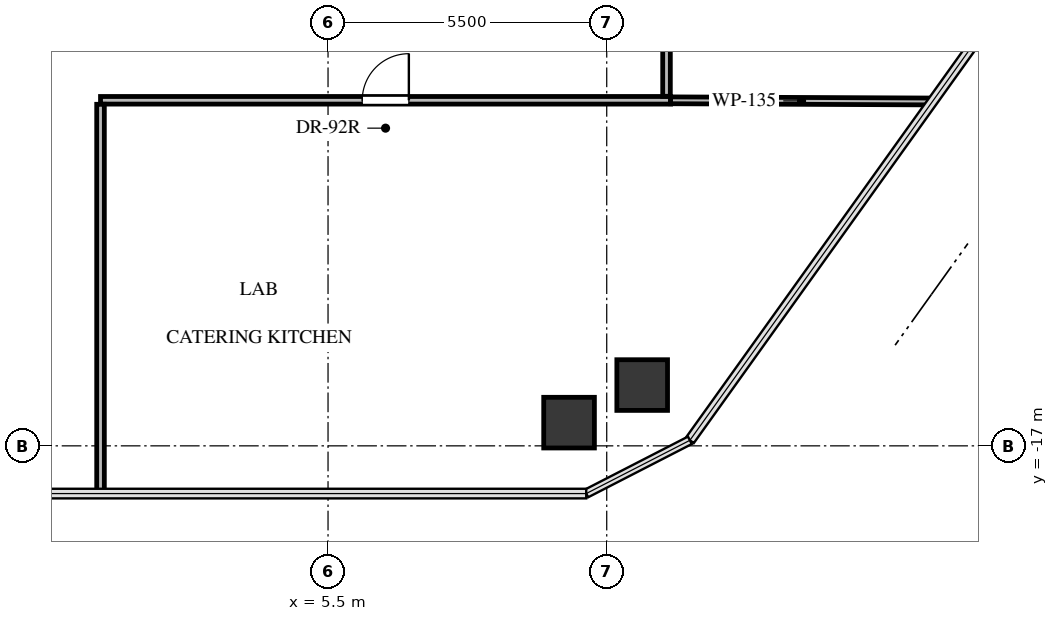
"""IFC4 building model, lengths in metres.
Left out: names, types, materials, properties, quantities, classifications, styles, units other than length and angle.
Written with IfcOpenShell. Run it as: python <this file> out.ifc"""

import sys

from ifc_helpers import new_model, si_unit, direction, frame, frame_2d, origin, origin_2d, place, context, subcontext, project, spatial, rectangle, extrude, source, transform, mapped, element, fill, save


model = new_model("IFC4")
c1 = context("Model", 3, precision=1e-05, world=origin(), true_north=direction((0.0, 1.0)))
c2 = subcontext(c1, "Body", "Model", "MODEL_VIEW")
j1 = project(units=[si_unit("LENGTHUNIT", "METRE"), si_unit("PLANEANGLEUNIT", "RADIAN")], contexts=[c1])
p1 = place(None, origin())
s1 = spatial("IfcSite", under=j1, at=p1, CompositionType="ELEMENT")
p2 = place(p1, origin())
s2 = spatial("IfcBuilding", under=s1, at=p2, CompositionType="ELEMENT")
p3 = place(p2, frame((0.0, 0.0, 170.5)))
s3 = spatial("IfcBuildingStorey", under=s2, at=p3, CompositionType="ELEMENT", Elevation=170.5)
m1 = source(origin(), c2, "Body", "SweptSolid", [
    extrude(rectangle(XDim=1.0, YDim=1.0, at=origin_2d()), origin(), (0.0, 0.0, 1.0), 3.3),
])
for number, where, z_axis, x_axis in (
    (1, (11.7, -15.8, -0.24), (0.0, 0.0, 1.0), (1.0, 0.0, 0.0)),
    (2, (10.257, -16.542, -0.24), (0.0, 0.0, 1.0), (1.0, 0.0, 0.0)),
):
    element("IfcColumn", number, at=place(p3, frame(where, z_axis=z_axis, x_axis=x_axis)), inside=s3, PredefinedType="COLUMN", context=c2, shape_type="MappedRepresentation", body=[
        mapped(m1, transform((0.0, 0.0, 0.0), x_axis=(1.0, 0.0, 0.0), y_axis=(0.0, 1.0, 0.0), z_axis=(0.0, 0.0, 1.0), scale=1.0)),
    ])
p4 = place(p3, frame((1.01, -10.18, 0.0), z_axis=(0.0, 0.0, 1.0), x_axis=(1.0, 0.0, 0.0)))
e3 = element("IfcWall", 3, at=p4, inside=s3, PredefinedType="PARTITIONING", context=c2, shape_type="SweptSolid", body=[
    extrude(rectangle(XDim=11.25, YDim=0.15, at=frame_2d((5.625, 0.0))), origin(), (0.0, 0.0, 1.0), 2.242),
])
p5 = place(p4, frame((5.165, 0.0, 0.0)))
e4 = element("IfcOpeningElement", 4, at=p5, cuts=e3, PredefinedType="OPENING", context=c2, shape_type="SweptSolid", body=[
    extrude(rectangle(XDim=0.92, YDim=2.1, at=frame_2d((0.46, 1.05))), frame((0.0, 0.085, 0.0), z_axis=(0.0, -1.0, 0.0), x_axis=(1.0, 0.0, 0.0)), (0.0, 0.0, 1.0), 0.17),
])
p6 = place(p3, frame((1.01, -17.942, 0.0), z_axis=(0.0, 0.0, 1.0), x_axis=(0.0, 1.0, 0.0)))
e5 = element("IfcWall", 5, at=p6, inside=s3, PredefinedType="PARTITIONING", context=c2, shape_type="SweptSolid", body=[
    extrude(rectangle(XDim=7.683, YDim=0.15, at=frame_2d((3.841, 0.0))), origin(), (0.0, 0.0, 1.0), 2.399),
])
p7 = place(p3, frame((12.18, -10.101, 0.0), z_axis=(0.0, 0.0, 1.0), x_axis=(0.0, 1.0, 0.0)))
e6 = element("IfcWall", 6, at=p7, inside=s3, PredefinedType="PARTITIONING", context=c2, shape_type="SweptSolid", body=[
    extrude(rectangle(XDim=1.661, YDim=0.15, at=frame_2d((0.831, 0.0))), origin(), (0.0, 0.0, 1.0), 3.045),
])
p8 = place(p3, frame((12.26, -10.18, 0.0), z_axis=(0.0, 0.0, 1.0), x_axis=(0.999990144117, -0.004439782427, 0.0)))
e7 = element("IfcWall", 7, at=p8, inside=s3, PredefinedType="PARTITIONING", context=c2, shape_type="SweptSolid", body=[
    extrude(rectangle(XDim=5.169, YDim=0.135, at=frame_2d((2.584, 0.0))), origin(), (0.0, 0.0, 1.0), 2.399),
])
m2 = source(origin(), c2, "Body", "SweptSolid", [
    extrude(rectangle(XDim=0.92, YDim=2.1, at=frame_2d((0.46, 1.05))), frame((0.0, 0.025, 0.0), z_axis=(0.0, -1.0, 0.0), x_axis=(1.0, 0.0, 0.0)), (0.0, 0.0, 1.0), 0.05),
])
p9 = place(p5, origin())
e8 = element("IfcDoor", 8, at=p9, inside=s3, OperationType="SINGLE_SWING_RIGHT", PredefinedType="DOOR", context=c2, shape_type="MappedRepresentation", body=[
    mapped(m2, transform((0.0, 0.0, 0.0), x_axis=(1.0, 0.0, 0.0), y_axis=(0.0, 1.0, 0.0), z_axis=(0.0, 0.0, 1.0), scale=1.0)),
])
fill(e4, e8)
save(model, sys.argv[1])
